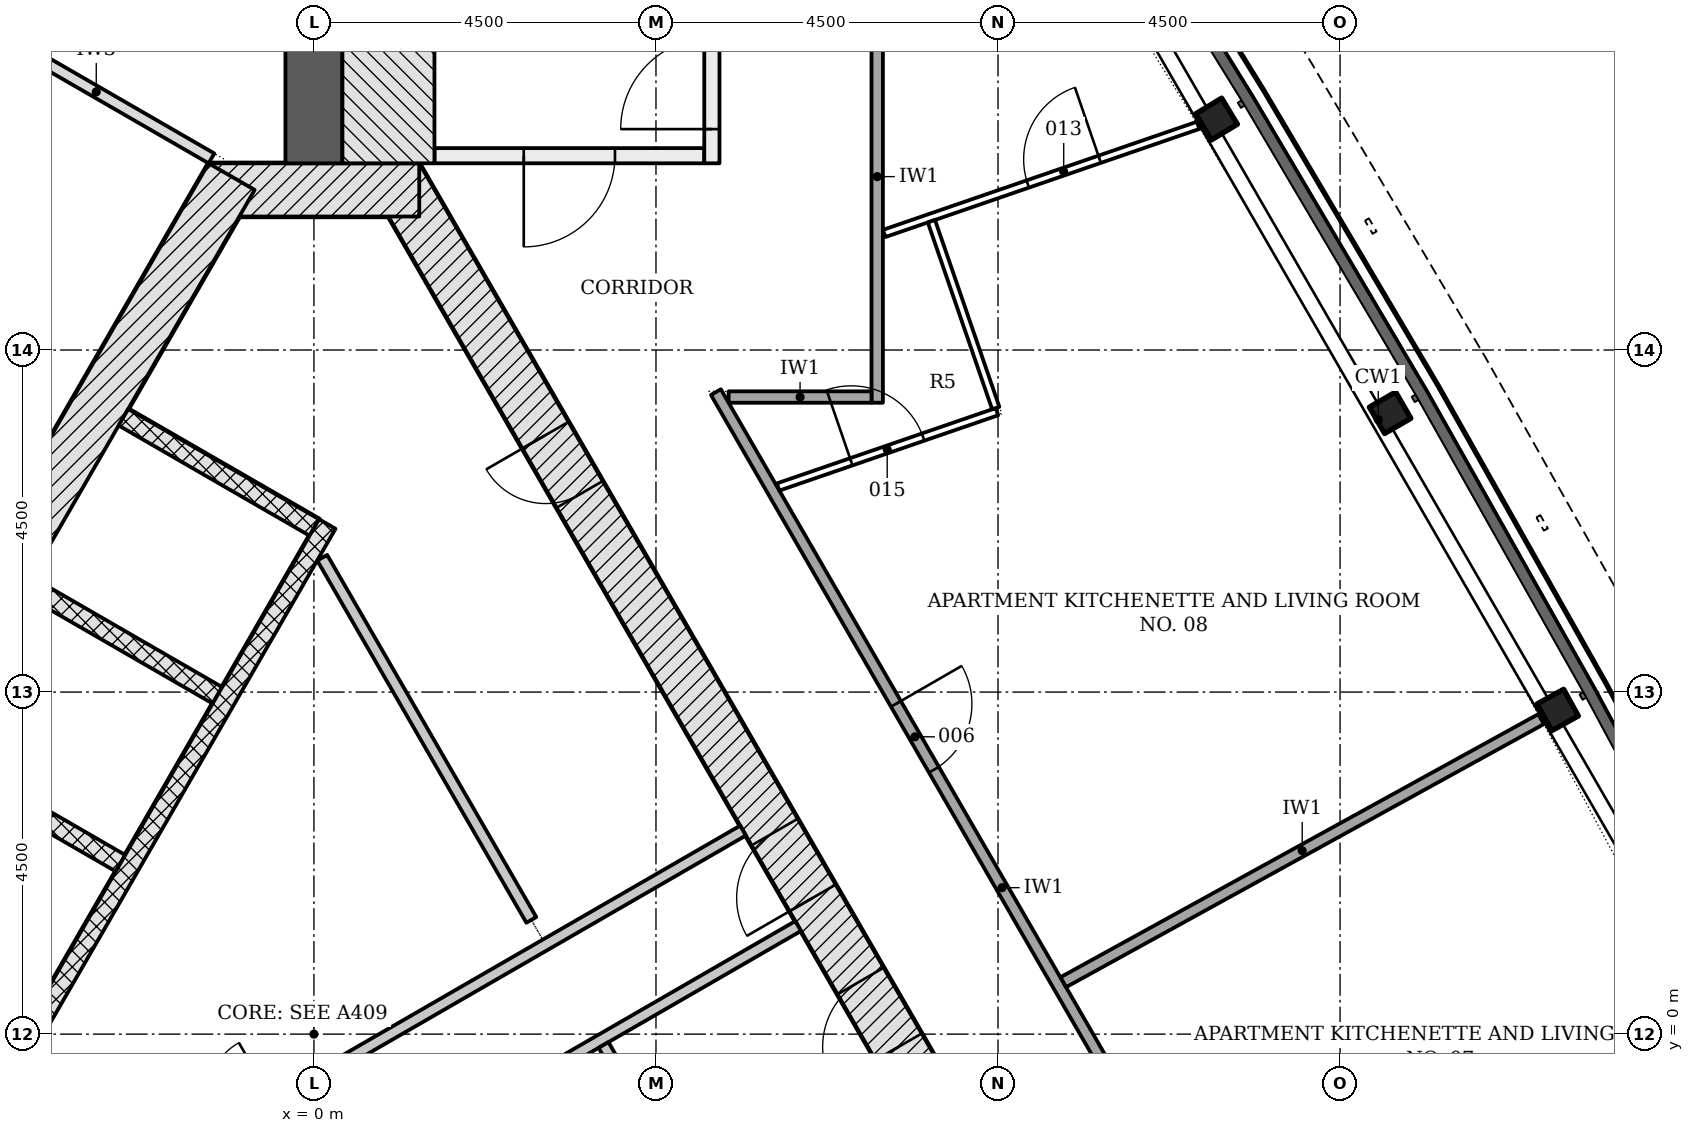
"""IFC4 building model, lengths in metres.
Left out: names, types, materials, properties, quantities, classifications, styles, units other than length and angle.
Written with IfcOpenShell. Run it as: python <this file> out.ifc"""

import sys

from ifc_helpers import new_model, si_unit, direction, frame, frame_2d, origin, origin_2d, place, context, subcontext, project, spatial, rectangle, i_section, extrude, element, fill, save


model = new_model("IFC4")
c1 = context("Model", 3, precision=1e-05, world=origin(), true_north=direction((0.0, 1.0)))
c2 = subcontext(c1, "Body", "Model", "MODEL_VIEW")
j1 = project(units=[si_unit("LENGTHUNIT", "METRE"), si_unit("PLANEANGLEUNIT", "RADIAN")], contexts=[c1])
p1 = place(None, origin())
s1 = spatial("IfcSite", under=j1, at=p1, CompositionType="ELEMENT")
p2 = place(p1, origin())
s2 = spatial("IfcBuilding", under=s1, at=p2, CompositionType="ELEMENT")
p3 = place(p2, frame((0.0, 0.0, 116.7)))
s3 = spatial("IfcBuildingStorey", under=s2, at=p3, CompositionType="ELEMENT", Elevation=116.7)
p4 = place(p3, frame((10.311, -4.703, -0.2), z_axis=(0.0, 0.0, 1.0), x_axis=(-0.500001446645, 0.866024568562, 0.0)))
e1 = element("IfcWall", 1, at=p4, inside=s3, PredefinedType="SHEAR", context=c2, shape_type="SweptSolid", body=[
    extrude(rectangle(XDim=18.458, YDim=0.7, at=frame_2d((9.229, 0.0))), origin(), (0.0, 0.0, 1.0), 3.6),
])
p5 = place(p4, frame((7.5, 0.0, 0.2)))
e2 = element("IfcOpeningElement", 2, at=p5, cuts=e1, PredefinedType="OPENING", context=c2, shape_type="SweptSolid", body=[
    extrude(rectangle(XDim=1.0, YDim=2.1, at=frame_2d((0.5, 1.05))), frame((0.0, 0.36, 0.0), z_axis=(0.0, -1.0, 0.0), x_axis=(1.0, 0.0, 0.0)), (0.0, 0.0, 1.0), 0.72),
])
p6 = place(p4, frame((1.852, 0.0, 0.2)))
e3 = element("IfcOpeningElement", 3, at=p6, cuts=e1, PredefinedType="OPENING", context=c2, shape_type="SweptSolid", body=[
    extrude(rectangle(XDim=0.9, YDim=2.1, at=frame_2d((0.45, 1.05))), frame((0.0, 0.36, 0.0), z_axis=(0.0, -1.0, 0.0), x_axis=(1.0, 0.0, 0.0)), (0.0, 0.0, 1.0), 0.72),
])
p7 = place(p4, frame((5.238, 0.0, 0.2)))
e4 = element("IfcOpeningElement", 4, at=p7, cuts=e1, PredefinedType="OPENING", context=c2, shape_type="SweptSolid", body=[
    extrude(rectangle(XDim=1.0, YDim=2.1, at=frame_2d((0.5, 1.05))), frame((0.0, 0.36, 0.0), z_axis=(0.0, -1.0, 0.0), x_axis=(1.0, 0.0, 0.0)), (0.0, 0.0, 1.0), 0.72),
])
p8 = place(p4, frame((13.63, 0.0, 0.2)))
e5 = element("IfcOpeningElement", 5, at=p8, cuts=e1, PredefinedType="OPENING", context=c2, shape_type="SweptSolid", body=[
    extrude(rectangle(XDim=0.9, YDim=2.1, at=frame_2d((0.45, 1.05))), frame((0.0, 0.36, 0.0), z_axis=(0.0, -1.0, 0.0), x_axis=(1.0, 0.0, 0.0)), (0.0, 0.0, 1.0), 0.72),
])
p9 = place(p3, frame((1.386, 11.106, -0.2), z_axis=(0.0, 0.0, 1.0), x_axis=(-1.0, 0.0, 0.0)))
e6 = element("IfcWall", 6, at=p9, inside=s3, PredefinedType="SHEAR", context=c2, shape_type="SweptSolid", body=[
    extrude(rectangle(XDim=2.771, YDim=0.7, at=frame_2d((1.386, 0.0))), origin(), (0.0, 0.0, 1.0), 3.6),
])
p10 = place(p3, frame((-1.083, 11.281, -0.2), z_axis=(0.0, 0.0, 1.0), x_axis=(-0.500001446645, -0.866024568562, 0.0)))
e7 = element("IfcWall", 7, at=p10, inside=s3, PredefinedType="SHEAR", context=c2, shape_type="SweptSolid", body=[
    extrude(rectangle(XDim=18.458, YDim=0.7, at=frame_2d((9.229, 0.0))), origin(), (0.0, 0.0, 1.0), 3.6),
])
p11 = place(p10, frame((8.979, 0.0, 0.2)))
e8 = element("IfcOpeningElement", 8, at=p11, cuts=e7, PredefinedType="OPENING", context=c2, shape_type="SweptSolid", body=[
    extrude(rectangle(XDim=1.2, YDim=2.1, at=frame_2d((0.6, 1.05))), frame((0.0, 0.36, 0.0), z_axis=(0.0, -1.0, 0.0), x_axis=(1.0, 0.0, 0.0)), (0.0, 0.0, 1.0), 0.72),
])
p12 = place(p10, frame((11.029, 0.0, 0.2)))
e9 = element("IfcOpeningElement", 9, at=p12, cuts=e7, PredefinedType="OPENING", context=c2, shape_type="SweptSolid", body=[
    extrude(rectangle(XDim=1.2, YDim=2.1, at=frame_2d((0.6, 1.05))), frame((0.0, 0.36, 0.0), z_axis=(0.0, -1.0, 0.0), x_axis=(1.0, 0.0, 0.0)), (0.0, 0.0, 1.0), 0.72),
])
p13 = place(p3, frame((0.0, 11.456, -0.2), z_axis=(0.0, 0.0, 1.0), x_axis=(0.0, 1.0, 0.0)))
e10 = element("IfcWall", 10, at=p13, inside=s3, PredefinedType="SHEAR", context=c2, shape_type="SweptSolid", body=[
    extrude(rectangle(XDim=11.539, YDim=0.75, at=frame_2d((5.77, 0.0))), origin(), (0.0, 0.0, 1.0), 3.6),
])
for number, where, z_axis, x_axis in (
    (11, (16.364, 4.265, -0.2), (0.0, 0.0, 1.0), (-0.482, 0.876, 0.0)),
    (12, (14.159, 8.175, -0.2), (0.0, 0.0, 1.0), (-0.5, 0.866, 0.0)),
    (13, (11.875, 12.039, -0.2), (0.0, 0.0, 1.0), (-0.517, 0.856, 0.0)),
):
    element("IfcColumn", number, at=place(p3, frame(where, z_axis=z_axis, x_axis=x_axis)), inside=s3, PredefinedType="COLUMN", context=c2, shape_type="SweptSolid", body=[
        extrude(i_section(OverallWidth=0.401, OverallDepth=0.399, WebThickness=0.025, FlangeThickness=0.04, FilletRadius=0.015, at=origin_2d()), origin(), (0.0, 0.0, 1.0), 3.6),
    ])
p14 = place(p3, frame((-2.506, 8.115, -0.2), z_axis=(0.0, 0.0, 1.0), x_axis=(0.865996321171, -0.50005036918, 0.0)))
e14 = element("IfcWall", 14, at=p14, inside=s3, PredefinedType="PARTITIONING", context=c2, shape_type="SweptSolid", body=[
    extrude(rectangle(XDim=2.9, YDim=0.25, at=frame_2d((1.45, 0.0))), origin(), (0.0, 0.0, 1.0), 3.6),
])
for number, where, z_axis, x_axis in (
    (15, (-3.781, 5.907, -0.2), (0.0, 0.0, 1.0), (0.866, -0.5, 0.0)),
    (16, (-5.056, 3.699, -0.2), (0.0, 0.0, 1.0), (0.866, -0.5, 0.0)),
):
    element("IfcWall", number, at=place(p3, frame(where, z_axis=z_axis, x_axis=x_axis)), inside=s3, PredefinedType="PARTITIONING", context=c2, shape_type="SweptSolid", body=[
        extrude(rectangle(XDim=2.9, YDim=0.25, at=frame_2d((1.45, 0.0))), origin(), (0.0, 0.0, 1.0), 3.6),
    ])
p15 = place(p3, frame((0.176, 6.711, 0.0), z_axis=(0.0, 0.0, 1.0), x_axis=(-0.500004227369, -0.866022963098, 0.0)))
e17 = element("IfcWall", 17, at=p15, inside=s3, PredefinedType="PARTITIONING", context=c2, shape_type="SweptSolid", body=[
    extrude(rectangle(XDim=11.8, YDim=0.25, at=frame_2d((5.9, 0.0))), origin(), (0.0, 0.0, 1.0), 3.4),
])
p16 = place(p3, frame((-4.904, -3.413, 0.0), z_axis=(0.0, 0.0, 1.0), x_axis=(0.866020716117, 0.500008119189, 0.0)))
e18 = element("IfcWall", 18, at=p16, inside=s3, PredefinedType="PARTITIONING", context=c2, shape_type="SweptSolid", body=[
    extrude(rectangle(XDim=12.182, YDim=0.15, at=frame_2d((6.091, 0.0))), origin(), (0.0, 0.0, 1.0), 3.4),
])
p17 = place(p16, frame((4.142, 0.0, 0.0)))
e19 = element("IfcOpeningElement", 19, at=p17, cuts=e18, PredefinedType="OPENING", context=c2, shape_type="SweptSolid", body=[
    extrude(rectangle(XDim=0.9, YDim=2.1, at=frame_2d((0.45, 1.05))), frame((0.0, 0.085, 0.0), z_axis=(0.0, -1.0, 0.0), x_axis=(1.0, 0.0, 0.0)), (0.0, 0.0, 1.0), 0.17),
])
p18 = place(p3, frame((-2.004, -3.413, 0.0), z_axis=(0.0, 0.0, 1.0), x_axis=(0.866030034802, 0.499991978756, 0.0)))
e20 = element("IfcWall", 20, at=p18, inside=s3, PredefinedType="PARTITIONING", context=c2, shape_type="SweptSolid", body=[
    extrude(rectangle(XDim=9.671, YDim=0.15, at=frame_2d((4.835, 0.0))), origin(), (0.0, 0.0, 1.0), 3.4),
])
p19 = place(p18, frame((2.886, 0.0, 0.0)))
e21 = element("IfcOpeningElement", 21, at=p19, cuts=e20, PredefinedType="OPENING", context=c2, shape_type="SweptSolid", body=[
    extrude(rectangle(XDim=0.9, YDim=2.1, at=frame_2d((0.45, 1.05))), frame((0.0, 0.085, 0.0), z_axis=(0.0, -1.0, 0.0), x_axis=(1.0, 0.0, 0.0)), (0.0, 0.0, 1.0), 0.17),
])
p20 = place(p3, frame((2.86, 1.503, 0.0), z_axis=(0.0, 0.0, 1.0), x_axis=(-0.500014382217, 0.866017100048, 0.0)))
e22 = element("IfcWall", 22, at=p20, inside=s3, PredefinedType="PARTITIONING", context=c2, shape_type="SweptSolid", body=[
    extrude(rectangle(XDim=5.502, YDim=0.15, at=frame_2d((2.751, 0.0))), origin(), (0.0, 0.0, 1.0), 3.4),
])
p21 = place(p3, frame((5.713, -3.439, 0.0), z_axis=(0.0, 0.0, 1.0), x_axis=(-0.499981559197, 0.866036050325, 0.0)))
e23 = element("IfcWall", 23, at=p21, inside=s3, PredefinedType="PARTITIONING", context=c2, shape_type="SweptSolid", body=[
    extrude(rectangle(XDim=3.806, YDim=0.15, at=frame_2d((1.903, 0.0))), origin(), (0.0, 0.0, 1.0), 3.4),
])
p22 = place(p3, frame((5.135, 11.556, -0.2), z_axis=(0.0, 0.0, 1.0), x_axis=(-1.0, 0.0, 0.0)))
e24 = element("IfcWall", 24, at=p22, inside=s3, PredefinedType="SHEAR", context=c2, shape_type="SweptSolid", body=[
    extrude(rectangle(XDim=3.55, YDim=0.2, at=frame_2d((1.775, 0.0))), origin(), (0.0, 0.0, 1.0), 3.6),
])
p23 = place(p22, frame((1.175, 0.0, 0.2)))
e25 = element("IfcOpeningElement", 25, at=p23, cuts=e24, PredefinedType="OPENING", context=c2, shape_type="SweptSolid", body=[
    extrude(rectangle(XDim=1.2, YDim=2.1, at=frame_2d((0.6, 1.05))), frame((0.0, 0.11, 0.0), z_axis=(0.0, -1.0, 0.0), x_axis=(1.0, 0.0, 0.0)), (0.0, 0.0, 1.0), 0.22),
])
p24 = place(p3, frame((5.236, 11.456, -0.2), z_axis=(0.0, 0.0, 1.0), x_axis=(0.0, 1.0, 0.0)))
e26 = element("IfcWall", 26, at=p24, inside=s3, PredefinedType="SHEAR", context=c2, shape_type="SweptSolid", body=[
    extrude(rectangle(XDim=5.6, YDim=0.2, at=frame_2d((2.8, 0.0))), origin(), (0.0, 0.0, 1.0), 3.6),
])
p25 = place(p24, frame((0.45, 0.0, 0.2)))
e27 = element("IfcOpeningElement", 27, at=p25, cuts=e26, PredefinedType="OPENING", context=c2, shape_type="SweptSolid", body=[
    extrude(rectangle(XDim=1.2, YDim=2.1, at=frame_2d((0.6, 1.05))), frame((0.0, 0.11, 0.0), z_axis=(0.0, -1.0, 0.0), x_axis=(1.0, 0.0, 0.0)), (0.0, 0.0, 1.0), 0.22),
])
p26 = place(p3, frame((0.98, 11.456, -0.2), z_axis=(0.0, 0.0, 1.0), x_axis=(0.0, 1.0, 0.0)))
e28 = element("IfcWall", 28, at=p26, inside=s3, PredefinedType="SHEAR", context=c2, shape_type="SweptSolid", body=[
    extrude(rectangle(XDim=7.2, YDim=1.211, at=frame_2d((3.6, 0.0))), origin(), (0.0, 0.0, 1.0), 3.6),
])
p27 = place(p3, frame((5.289, 8.446, 0.0), z_axis=(0.0, 0.0, 1.0), x_axis=(0.499996620721, -0.866027354803, 0.0)))
e29 = element("IfcWall", 29, at=p27, inside=s3, PredefinedType="PARTITIONING", context=c2, shape_type="SweptSolid", body=[
    extrude(rectangle(XDim=15.057, YDim=0.15, at=frame_2d((7.528, 0.0))), origin(), (0.0, 0.0, 1.0), 2.847),
])
p28 = place(p27, frame((11.17, 0.0, 0.0)))
e30 = element("IfcOpeningElement", 30, at=p28, cuts=e29, PredefinedType="OPENING", context=c2, shape_type="SweptSolid", body=[
    extrude(rectangle(XDim=1.0, YDim=2.1, at=frame_2d((0.5, 1.05))), frame((0.0, 0.085, 0.0), z_axis=(0.0, -1.0, 0.0), x_axis=(1.0, 0.0, 0.0)), (0.0, 0.0, 1.0), 0.17),
])
p29 = place(p27, frame((4.736, 0.0, 0.0)))
e31 = element("IfcOpeningElement", 31, at=p29, cuts=e29, PredefinedType="OPENING", context=c2, shape_type="SweptSolid", body=[
    extrude(rectangle(XDim=1.0, YDim=2.1, at=frame_2d((0.5, 1.05))), frame((0.0, 0.085, 0.0), z_axis=(0.0, -1.0, 0.0), x_axis=(1.0, 0.0, 0.0)), (0.0, 0.0, 1.0), 0.17),
])
p30 = place(p3, frame((7.411, 8.306, 0.0), z_axis=(0.0, 0.0, 1.0), x_axis=(0.0, 1.0, 0.0)))
e32 = element("IfcWall", 32, at=p30, inside=s3, PredefinedType="PARTITIONING", context=c2, shape_type="SweptSolid", body=[
    extrude(rectangle(XDim=5.95, YDim=0.15, at=frame_2d((2.975, 0.0))), origin(), (0.0, 0.0, 1.0), 2.847),
])
p31 = place(p3, frame((-4.379, 13.271, 0.0), z_axis=(0.0, 0.0, 1.0), x_axis=(0.866019471182, -0.500010275428, 0.0)))
e33 = element("IfcWall", 33, at=p31, inside=s3, PredefinedType="PARTITIONING", context=c2, shape_type="SweptSolid", body=[
    extrude(rectangle(XDim=3.5, YDim=0.15, at=frame_2d((1.75, 0.0))), origin(), (0.0, 0.0, 1.0), 3.4),
])
p32 = place(p3, frame((5.456, 8.381, 0.0), z_axis=(0.0, 0.0, 1.0), x_axis=(1.0, 0.0, 0.0)))
e34 = element("IfcWall", 34, at=p32, inside=s3, PredefinedType="PARTITIONING", context=c2, shape_type="SweptSolid", body=[
    extrude(rectangle(XDim=1.88, YDim=0.15, at=frame_2d((0.94, 0.0))), origin(), (0.0, 0.0, 1.0), 2.847),
])
p33 = place(p3, frame((16.145, 4.144, 0.0), z_axis=(0.0, 0.0, 1.0), x_axis=(-0.875990246448, -0.482328817434, 0.0)))
e35 = element("IfcWall", 35, at=p33, inside=s3, PredefinedType="PARTITIONING", context=c2, shape_type="SweptSolid", body=[
    extrude(rectangle(XDim=7.176, YDim=0.15, at=frame_2d((3.588, 0.0))), origin(), (0.0, 0.0, 1.0), 2.847),
])
p34 = place(p3, frame((7.502, 10.534, 0.0), z_axis=(0.0, 0.0, 1.0), x_axis=(0.945553375074, 0.325467071893, 0.0)))
e36 = element("IfcWall", 36, at=p34, inside=s3, PredefinedType="PARTITIONING", context=c2, shape_type="SweptSolid", body=[
    extrude(rectangle(XDim=4.369, YDim=0.1, at=frame_2d((2.184, 0.0))), origin(), (0.0, 0.0, 1.0), 2.847),
])
p35 = place(p34, frame((1.998, 0.0, 0.0)))
e37 = element("IfcOpeningElement", 37, at=p35, cuts=e36, PredefinedType="OPENING", context=c2, shape_type="SweptSolid", body=[
    extrude(rectangle(XDim=1.0, YDim=2.1, at=frame_2d((0.5, 1.05))), frame((0.0, 0.06, 0.0), z_axis=(0.0, -1.0, 0.0), x_axis=(1.0, 0.0, 0.0)), (0.0, 0.0, 1.0), 0.12),
])
p36 = place(p3, frame((6.107, 7.198, 0.0), z_axis=(0.0, 0.0, 1.0), x_axis=(0.94554324897, 0.325496488962, 0.0)))
e38 = element("IfcWall", 38, at=p36, inside=s3, PredefinedType="PARTITIONING", context=c2, shape_type="SweptSolid", body=[
    extrude(rectangle(XDim=3.045, YDim=0.1, at=frame_2d((1.522, 0.0))), origin(), (0.0, 0.0, 1.0), 3.4),
])
p37 = place(p36, frame((1.018, 0.0, 0.0)))
e39 = element("IfcOpeningElement", 39, at=p37, cuts=e38, PredefinedType="OPENING", context=c2, shape_type="SweptSolid", body=[
    extrude(rectangle(XDim=1.0, YDim=2.1, at=frame_2d((0.5, 1.05))), frame((0.0, 0.06, 0.0), z_axis=(0.0, -1.0, 0.0), x_axis=(1.0, 0.0, 0.0)), (0.0, 0.0, 1.0), 0.12),
])
p38 = place(p3, frame((8.124, 10.695, 0.0), z_axis=(0.0, 0.0, 1.0), x_axis=(0.325536334257, -0.945529531574, 0.0)))
e40 = element("IfcWall", 40, at=p38, inside=s3, PredefinedType="PARTITIONING", context=c2, shape_type="SweptSolid", body=[
    extrude(rectangle(XDim=2.6, YDim=0.1, at=frame_2d((1.3, 0.0))), origin(), (0.0, 0.0, 1.0), 2.847),
])
p39 = place(p5, origin())
e41 = element("IfcDoor", 41, at=p39, inside=s3, OperationType="SINGLE_SWING_LEFT", PredefinedType="DOOR", context=c2, shape_type="SweptSolid", body=[
    extrude(rectangle(XDim=1.0, YDim=2.1, at=frame_2d((0.5, 1.05))), frame((0.0, 0.075, 0.0), z_axis=(0.0, -1.0, 0.0), x_axis=(1.0, 0.0, 0.0)), (0.0, 0.0, 1.0), 0.15),
])
fill(e2, e41)
p40 = place(p7, origin())
e42 = element("IfcDoor", 42, at=p40, inside=s3, OperationType="SINGLE_SWING_LEFT", PredefinedType="DOOR", context=c2, shape_type="SweptSolid", body=[
    extrude(rectangle(XDim=1.0, YDim=2.1, at=frame_2d((0.5, 1.05))), frame((0.0, 0.075, 0.0), z_axis=(0.0, -1.0, 0.0), x_axis=(1.0, 0.0, 0.0)), (0.0, 0.0, 1.0), 0.15),
])
fill(e4, e42)
p41 = place(p8, origin())
e43 = element("IfcDoor", 43, at=p41, inside=s3, OperationType="SINGLE_SWING_RIGHT", PredefinedType="DOOR", context=c2, shape_type="SweptSolid", body=[
    extrude(rectangle(XDim=0.9, YDim=2.1, at=frame_2d((0.45, 1.05))), frame((0.0, 0.075, 0.0), z_axis=(0.0, -1.0, 0.0), x_axis=(1.0, 0.0, 0.0)), (0.0, 0.0, 1.0), 0.15),
])
fill(e5, e43)
p42 = place(p23, origin())
e44 = element("IfcDoor", 44, at=p42, inside=s3, OperationType="SINGLE_SWING_RIGHT", PredefinedType="DOOR", context=c2, shape_type="SweptSolid", body=[
    extrude(rectangle(XDim=1.2, YDim=2.1, at=frame_2d((0.6, 1.05))), frame((0.0, 0.025, 0.0), z_axis=(0.0, -1.0, 0.0), x_axis=(1.0, 0.0, 0.0)), (0.0, 0.0, 1.0), 0.05),
])
fill(e25, e44)
p43 = place(p25, origin())
e45 = element("IfcDoor", 45, at=p43, inside=s3, OperationType="SINGLE_SWING_LEFT", PredefinedType="DOOR", context=c2, shape_type="SweptSolid", body=[
    extrude(rectangle(XDim=1.2, YDim=2.1, at=frame_2d((0.6, 1.05))), frame((0.0, 0.025, 0.0), z_axis=(0.0, -1.0, 0.0), x_axis=(1.0, 0.0, 0.0)), (0.0, 0.0, 1.0), 0.05),
])
fill(e27, e45)
p44 = place(p29, origin())
e46 = element("IfcDoor", 46, at=p44, inside=s3, OperationType="SINGLE_SWING_LEFT", PredefinedType="DOOR", context=c2, shape_type="SweptSolid", body=[
    extrude(rectangle(XDim=1.0, YDim=2.1, at=frame_2d((0.5, 1.05))), frame((0.0, 0.025, 0.0), z_axis=(0.0, -1.0, 0.0), x_axis=(1.0, 0.0, 0.0)), (0.0, 0.0, 1.0), 0.05),
])
fill(e31, e46)
p45 = place(p35, origin())
e47 = element("IfcDoor", 47, at=p45, inside=s3, OperationType="SINGLE_SWING_RIGHT", PredefinedType="DOOR", context=c2, shape_type="SweptSolid", body=[
    extrude(rectangle(XDim=1.0, YDim=2.1, at=frame_2d((0.5, 1.05))), frame((0.0, 0.025, 0.0), z_axis=(0.0, -1.0, 0.0), x_axis=(1.0, 0.0, 0.0)), (0.0, 0.0, 1.0), 0.05),
])
fill(e37, e47)
p46 = place(p37, origin())
e48 = element("IfcDoor", 48, at=p46, inside=s3, OperationType="SINGLE_SWING_LEFT", PredefinedType="DOOR", context=c2, shape_type="SweptSolid", body=[
    extrude(rectangle(XDim=1.0, YDim=2.1, at=frame_2d((0.5, 1.05))), frame((0.0, 0.025, 0.0), z_axis=(0.0, -1.0, 0.0), x_axis=(1.0, 0.0, 0.0)), (0.0, 0.0, 1.0), 0.05),
])
fill(e39, e48)
save(model, sys.argv[1])
